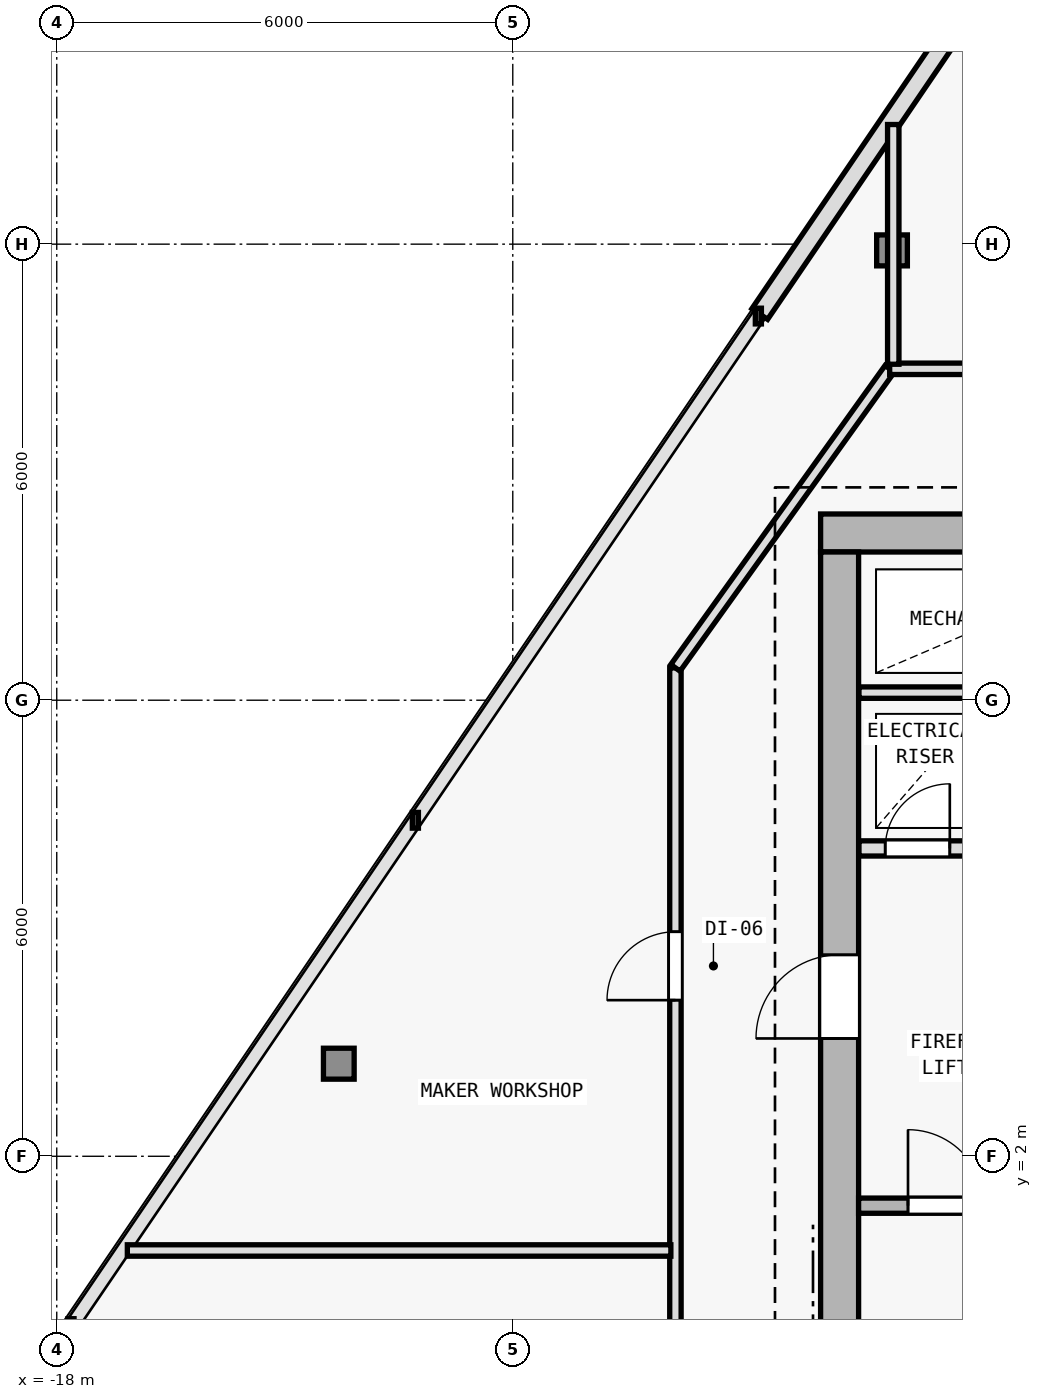
"""IFC4 building model, lengths in metres.
Left out: names, types, materials, properties, quantities, classifications, styles, units other than length and angle.
Written with IfcOpenShell. Run it as: python <this file> out.ifc"""

import sys

from ifc_helpers import new_model, si_unit, direction, frame, frame_2d, origin, origin_2d, place, context, subcontext, project, spatial, rectangle, i_section, extrude, element, fill, save


model = new_model("IFC4")
c1 = context("Model", 3, precision=1e-05, world=origin(), true_north=direction((0.0, 1.0)))
c2 = subcontext(c1, "Body", "Model", "MODEL_VIEW")
j1 = project(units=[si_unit("LENGTHUNIT", "METRE"), si_unit("PLANEANGLEUNIT", "RADIAN")], contexts=[c1])
p1 = place(None, origin())
s1 = spatial("IfcSite", under=j1, at=p1, CompositionType="ELEMENT")
p2 = place(p1, origin())
s2 = spatial("IfcBuilding", under=s1, at=p2, CompositionType="ELEMENT")
p3 = place(p2, frame((0.0, 0.0, 142.2)))
s3 = spatial("IfcBuildingStorey", under=s2, at=p3, CompositionType="ELEMENT", Elevation=142.2)
for number, where, z_axis, x_axis in (
    (1, (-7.7, 10.2, 0.0), (0.0, 0.0, 1.0), (1.0, 0.0, 0.0)),
    (2, (-7.7, 2.0, 0.0), (0.0, 0.0, 1.0), (1.0, 0.0, 0.0)),
):
    element("IfcColumn", number, at=place(p3, frame(where, z_axis=z_axis, x_axis=x_axis)), inside=s3, PredefinedType="COLUMN", context=c2, shape_type="SweptSolid", body=[
        extrude(i_section(OverallWidth=0.404, OverallDepth=0.407, WebThickness=0.017, FlangeThickness=0.028, FilletRadius=0.015, at=origin_2d()), origin(), (0.0, 0.0, 1.0), 3.6),
    ])
p4 = place(p3, frame((-7.01, 13.918, 0.006), z_axis=(0.009047216916, -0.002652943306, 0.999955553891), x_axis=(0.281384988428, 0.959594960537, 0.0)))
e3 = element("IfcColumn", 3, at=p4, inside=s3, PredefinedType="COLUMN", context=c2, shape_type="SweptSolid", body=[
    extrude(i_section(OverallWidth=0.404, OverallDepth=0.407, WebThickness=0.017, FlangeThickness=0.028, FilletRadius=0.015, at=origin_2d()), origin(), (0.0, 0.0, 1.0), 3.589),
])
p5 = place(p3, frame((-14.289, 3.218, 0.006), z_axis=(0.017479483538, 0.009793951865, 0.999799252931), x_axis=(-0.488810085697, 0.87239022239, 0.0)))
e4 = element("IfcColumn", 4, at=p5, inside=s3, PredefinedType="COLUMN", context=c2, shape_type="SweptSolid", body=[
    extrude(i_section(OverallWidth=0.404, OverallDepth=0.407, WebThickness=0.017, FlangeThickness=0.028, FilletRadius=0.015, at=origin_2d()), origin(), (0.0, 0.0, 1.0), 3.59),
])
p6 = place(p3, frame((-8.75, 13.081, 0.0), z_axis=(0.0, 0.0, 1.0), x_axis=(0.562463958751, 0.82682180372, 0.0)))
e5 = element("IfcWall", 5, at=p6, inside=s3, PredefinedType="SOLIDWALL", context=c2, shape_type="SweptSolid", body=[
    extrude(rectangle(XDim=11.322, YDim=0.25, at=frame_2d((5.661, 0.0))), origin(), (0.0, 0.0, 1.0), 3.35),
])
p7 = place(p6, frame((4.761, 0.0, 0.62)))
e6 = element("IfcOpeningElement", 6, at=p7, cuts=e5, PredefinedType="OPENING", context=c2, shape_type="SweptSolid", body=[
    extrude(rectangle(XDim=1.8, YDim=2.1, at=frame_2d((0.9, 1.05))), frame((0.0, 0.135, 0.0), z_axis=(0.0, -1.0, 0.0), x_axis=(1.0, 0.0, 0.0)), (0.0, 0.0, 1.0), 0.27),
])
p8 = place(p3, frame((7.95, 10.2, 0.0), z_axis=(0.0, 0.0, 1.0), x_axis=(-1.0, 0.0, 0.0)))
e7 = element("IfcWall", 7, at=p8, inside=s3, PredefinedType="SHEAR", context=c2, shape_type="SweptSolid", body=[
    extrude(rectangle(XDim=15.9, YDim=0.5, at=frame_2d((7.95, 0.0))), origin(), (0.0, 0.0, 1.0), 3.35),
])
p9 = place(p8, frame((4.4, 0.0, 0.0)))
e8 = element("IfcOpeningElement", 8, at=p9, cuts=e7, PredefinedType="OPENING", context=c2, shape_type="SweptSolid", body=[
    extrude(rectangle(XDim=1.1, YDim=2.15, at=frame_2d((0.55, 1.075))), frame((0.0, 0.26, 0.0), z_axis=(0.0, -1.0, 0.0), x_axis=(1.0, 0.0, 0.0)), (0.0, 0.0, 1.0), 0.52),
])
p10 = place(p3, frame((-7.7, -9.15, 0.0), z_axis=(0.0, 0.0, 1.0), x_axis=(0.0, 1.0, 0.0)))
e9 = element("IfcWall", 9, at=p10, inside=s3, PredefinedType="SHEAR", context=c2, shape_type="SweptSolid", body=[
    extrude(rectangle(XDim=19.1, YDim=0.5, at=frame_2d((9.55, 0.0))), origin(), (0.0, 0.0, 1.0), 3.35),
])
p11 = place(p10, frame((12.7, 0.0, 0.0)))
e10 = element("IfcOpeningElement", 10, at=p11, cuts=e9, PredefinedType="OPENING", context=c2, shape_type="SweptSolid", body=[
    extrude(rectangle(XDim=1.1, YDim=2.15, at=frame_2d((0.55, 1.075))), frame((0.0, 0.26, 0.0), z_axis=(0.0, -1.0, 0.0), x_axis=(1.0, 0.0, 0.0)), (0.0, 0.0, 1.0), 0.52),
])
p12 = place(p3, frame((-7.45, 1.35, 0.0), z_axis=(0.0, 0.0, 1.0), x_axis=(1.0, 0.0, 0.0)))
e11 = element("IfcWall", 11, at=p12, inside=s3, PredefinedType="SOLIDWALL", context=c2, shape_type="SweptSolid", body=[
    extrude(rectangle(XDim=3.4, YDim=0.2, at=frame_2d((1.7, 0.0))), origin(), (0.0, 0.0, 1.0), 3.35),
])
p13 = place(p12, frame((0.65, 0.0, 0.0)))
e12 = element("IfcOpeningElement", 12, at=p13, cuts=e11, PredefinedType="OPENING", context=c2, shape_type="SweptSolid", body=[
    extrude(rectangle(XDim=1.0, YDim=2.15, at=frame_2d((0.5, 1.075))), frame((0.0, 0.11, 0.0), z_axis=(0.0, -1.0, 0.0), x_axis=(1.0, 0.0, 0.0)), (0.0, 0.0, 1.0), 0.22),
])
p14 = place(p3, frame((-7.445, 6.05, 0.0), z_axis=(0.0, 0.0, 1.0), x_axis=(1.0, 0.0, 0.0)))
e13 = element("IfcWall", 13, at=p14, inside=s3, PredefinedType="SOLIDWALL", context=c2, shape_type="SweptSolid", body=[
    extrude(rectangle(XDim=3.595, YDim=0.2, at=frame_2d((1.797, 0.0))), origin(), (0.0, 0.0, 1.0), 3.35),
])
p15 = place(p14, frame((0.345, 0.0, 0.0)))
e14 = element("IfcOpeningElement", 14, at=p15, cuts=e13, PredefinedType="OPENING", context=c2, shape_type="SweptSolid", body=[
    extrude(rectangle(XDim=0.85, YDim=2.1, at=frame_2d((0.425, 1.05))), frame((0.0, 0.11, 0.0), z_axis=(0.0, -1.0, 0.0), x_axis=(1.0, 0.0, 0.0)), (0.0, 0.0, 1.0), 0.22),
])
p16 = place(p14, frame((2.145, 0.0, 0.0)))
e15 = element("IfcOpeningElement", 15, at=p16, cuts=e13, PredefinedType="OPENING", context=c2, shape_type="SweptSolid", body=[
    extrude(rectangle(XDim=0.85, YDim=2.1, at=frame_2d((0.425, 1.05))), frame((0.0, 0.11, 0.0), z_axis=(0.0, -1.0, 0.0), x_axis=(1.0, 0.0, 0.0)), (0.0, 0.0, 1.0), 0.22),
])
p17 = place(p3, frame((-7.445, 8.1, 0.0), z_axis=(0.0, 0.0, 1.0), x_axis=(1.0, 0.0, 0.0)))
e16 = element("IfcWall", 16, at=p17, inside=s3, PredefinedType="PARTITIONING", context=c2, shape_type="SweptSolid", body=[
    extrude(rectangle(XDim=3.595, YDim=0.15, at=frame_2d((1.797, 0.0))), origin(), (0.0, 0.0, 1.0), 3.35),
])
p18 = place(p3, frame((-9.86, -11.56, 0.0), z_axis=(0.0, 0.0, 1.0), x_axis=(0.0, 1.0, 0.0)))
e17 = element("IfcWall", 17, at=p18, inside=s3, PredefinedType="PARTITIONING", context=c2, shape_type="SweptSolid", body=[
    extrude(rectangle(XDim=19.986, YDim=0.15, at=frame_2d((9.993, 0.0))), origin(), (0.0, 0.0, 1.0), 2.775),
])
p19 = place(p18, frame((7.769, 0.0, 0.0)))
e18 = element("IfcOpeningElement", 18, at=p19, cuts=e17, PredefinedType="OPENING", context=c2, shape_type="SweptSolid", body=[
    extrude(rectangle(XDim=0.9, YDim=2.1, at=frame_2d((0.45, 1.05))), frame((0.0, 0.085, 0.0), z_axis=(0.0, -1.0, 0.0), x_axis=(1.0, 0.0, 0.0)), (0.0, 0.0, 1.0), 0.17),
])
p20 = place(p18, frame((1.698, 0.0, 0.0)))
e19 = element("IfcOpeningElement", 19, at=p20, cuts=e17, PredefinedType="OPENING", context=c2, shape_type="SweptSolid", body=[
    extrude(rectangle(XDim=0.9, YDim=2.1, at=frame_2d((0.45, 1.05))), frame((0.0, 0.085, 0.0), z_axis=(0.0, -1.0, 0.0), x_axis=(1.0, 0.0, 0.0)), (0.0, 0.0, 1.0), 0.17),
])
p21 = place(p18, frame((15.614, 0.0, 0.0)))
e20 = element("IfcOpeningElement", 20, at=p21, cuts=e17, PredefinedType="OPENING", context=c2, shape_type="SweptSolid", body=[
    extrude(rectangle(XDim=0.9, YDim=2.1, at=frame_2d((0.45, 1.05))), frame((0.0, 0.085, 0.0), z_axis=(0.0, -1.0, 0.0), x_axis=(1.0, 0.0, 0.0)), (0.0, 0.0, 1.0), 0.17),
])
p22 = place(p3, frame((-9.86, 8.426, 0.0), z_axis=(0.0, 0.0, 1.0), x_axis=(0.582449511476, 0.812866881218, 0.0)))
e21 = element("IfcWall", 21, at=p22, inside=s3, PredefinedType="PARTITIONING", context=c2, shape_type="SweptSolid", body=[
    extrude(rectangle(XDim=4.84, YDim=0.15, at=frame_2d((2.42, 0.0))), origin(), (0.0, 0.0, 1.0), 2.965),
])
p23 = place(p3, frame((-7.041, 12.36, 0.0), z_axis=(0.0, 0.0, 1.0), x_axis=(1.0, 0.0, 0.0)))
e22 = element("IfcWall", 22, at=p23, inside=s3, PredefinedType="PARTITIONING", context=c2, shape_type="SweptSolid", body=[
    extrude(rectangle(XDim=14.064, YDim=0.15, at=frame_2d((7.032, 0.0))), origin(), (0.0, 0.0, 1.0), 2.965),
])
p24 = place(p23, frame((12.172, 0.0, 0.0)))
e23 = element("IfcOpeningElement", 23, at=p24, cuts=e22, PredefinedType="OPENING", context=c2, shape_type="SweptSolid", body=[
    extrude(rectangle(XDim=0.9, YDim=2.1, at=frame_2d((0.45, 1.05))), frame((0.0, 0.085, 0.0), z_axis=(0.0, -1.0, 0.0), x_axis=(1.0, 0.0, 0.0)), (0.0, 0.0, 1.0), 0.17),
])
p25 = place(p23, frame((9.224, 0.0, 0.0)))
e24 = element("IfcOpeningElement", 24, at=p25, cuts=e22, PredefinedType="OPENING", context=c2, shape_type="SweptSolid", body=[
    extrude(rectangle(XDim=0.9, YDim=2.1, at=frame_2d((0.45, 1.05))), frame((0.0, 0.085, 0.0), z_axis=(0.0, -1.0, 0.0), x_axis=(1.0, 0.0, 0.0)), (0.0, 0.0, 1.0), 0.17),
])
p26 = place(p23, frame((3.634, 0.0, 0.0)))
e25 = element("IfcOpeningElement", 25, at=p26, cuts=e22, PredefinedType="OPENING", context=c2, shape_type="SweptSolid", body=[
    extrude(rectangle(XDim=0.9, YDim=2.1, at=frame_2d((0.45, 1.05))), frame((0.0, 0.085, 0.0), z_axis=(0.0, -1.0, 0.0), x_axis=(1.0, 0.0, 0.0)), (0.0, 0.0, 1.0), 0.17),
])
p27 = place(p3, frame((-6.994, 12.42, 0.0), z_axis=(0.0, 0.0, 1.0), x_axis=(0.0, 1.0, 0.0)))
e26 = element("IfcWall", 26, at=p27, inside=s3, PredefinedType="PARTITIONING", context=c2, shape_type="SweptSolid", body=[
    extrude(rectangle(XDim=3.154, YDim=0.15, at=frame_2d((1.577, 0.0))), origin(), (0.0, 0.0, 1.0), 2.885),
])
p28 = place(p3, frame((-9.92, 0.76, 0.0), z_axis=(0.0, 0.0, 1.0), x_axis=(-1.0, 0.0, 0.0)))
e27 = element("IfcWall", 27, at=p28, inside=s3, PredefinedType="PARTITIONING", context=c2, shape_type="SweptSolid", body=[
    extrude(rectangle(XDim=7.151, YDim=0.15, at=frame_2d((3.576, 0.0))), origin(), (0.0, 0.0, 1.0), 2.825),
])
p29 = place(p11, origin())
e28 = element("IfcDoor", 28, at=p29, inside=s3, OperationType="SINGLE_SWING_LEFT", PredefinedType="DOOR", context=c2, shape_type="SweptSolid", body=[
    extrude(rectangle(XDim=1.1, YDim=2.15, at=frame_2d((0.55, 1.075))), frame((0.0, 0.025, 0.0), z_axis=(0.0, -1.0, 0.0), x_axis=(1.0, 0.0, 0.0)), (0.0, 0.0, 1.0), 0.05),
])
fill(e10, e28)
p30 = place(p13, origin())
e29 = element("IfcDoor", 29, at=p30, inside=s3, OperationType="SINGLE_SWING_LEFT", PredefinedType="DOOR", context=c2, shape_type="SweptSolid", body=[
    extrude(rectangle(XDim=1.0, YDim=2.15, at=frame_2d((0.5, 1.075))), frame((0.0, 0.025, 0.0), z_axis=(0.0, -1.0, 0.0), x_axis=(1.0, 0.0, 0.0)), (0.0, 0.0, 1.0), 0.05),
])
fill(e12, e29)
p31 = place(p15, origin())
e30 = element("IfcDoor", 30, at=p31, inside=s3, OperationType="SINGLE_SWING_RIGHT", PredefinedType="DOOR", context=c2, shape_type="SweptSolid", body=[
    extrude(rectangle(XDim=0.85, YDim=2.1, at=frame_2d((0.425, 1.05))), frame((0.0, 0.025, 0.0), z_axis=(0.0, -1.0, 0.0), x_axis=(1.0, 0.0, 0.0)), (0.0, 0.0, 1.0), 0.05),
])
fill(e14, e30)
p32 = place(p21, origin())
e31 = element("IfcDoor", 31, at=p32, inside=s3, OperationType="SINGLE_SWING_LEFT", PredefinedType="DOOR", context=c2, shape_type="SweptSolid", body=[
    extrude(rectangle(XDim=0.9, YDim=2.1, at=frame_2d((0.45, 1.05))), frame((0.0, 0.025, 0.0), z_axis=(0.0, -1.0, 0.0), x_axis=(1.0, 0.0, 0.0)), (0.0, 0.0, 1.0), 0.05),
])
fill(e20, e31)
save(model, sys.argv[1])
